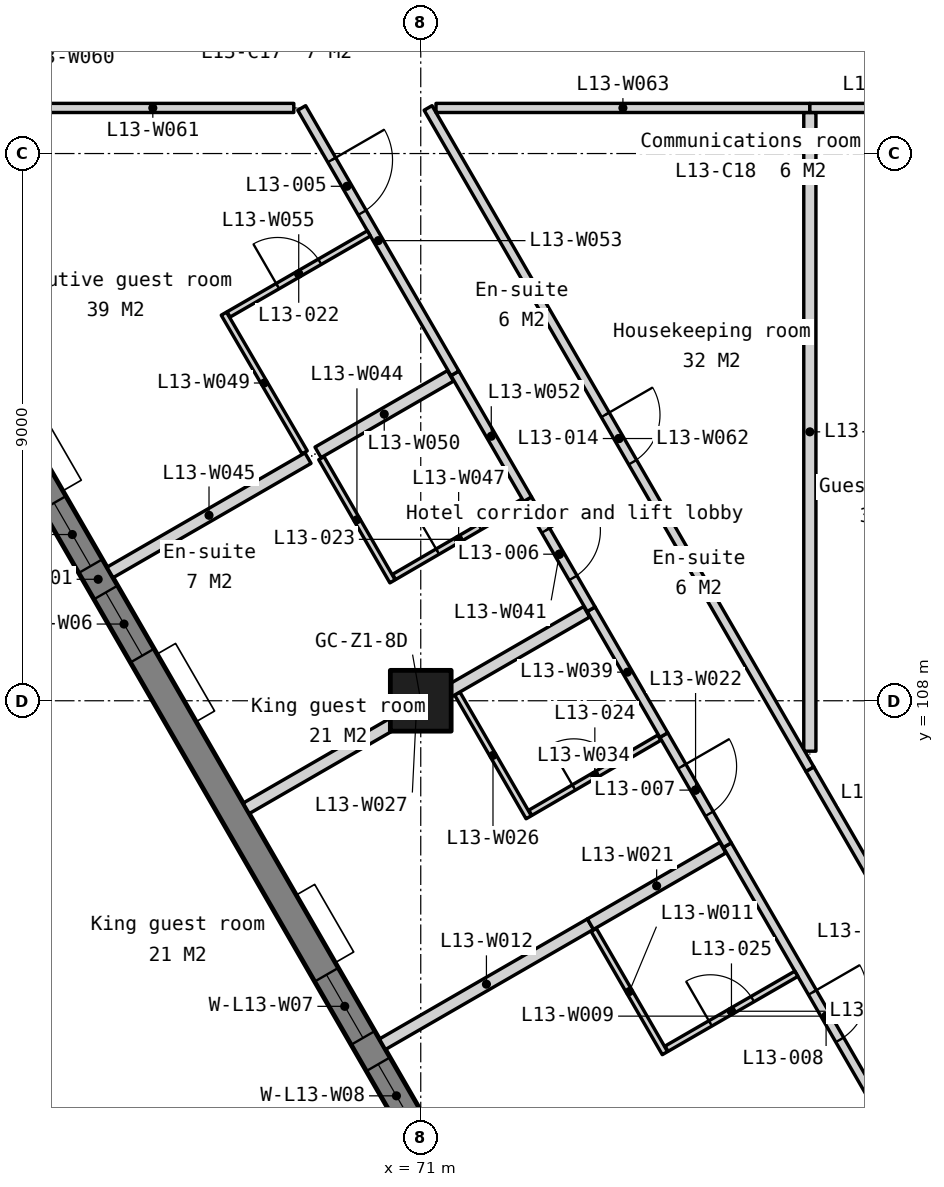
"""IFC4 building model, lengths in metres.
Left out: names, types, materials, properties, quantities, classifications, styles, units other than length and angle.
Written with IfcOpenShell. Run it as: python <this file> out.ifc"""

import sys

from ifc_helpers import new_model, si_unit, direction, frame, frame_2d, origin, origin_2d, place, context, subcontext, project, spatial, polyline, rectangle, outline, extrude, element, fill, save


model = new_model("IFC4")
c1 = context("Model", 3, precision=1e-05, world=origin(), true_north=direction((0.0, 1.0)))
c2 = subcontext(c1, "Body", "Model", "MODEL_VIEW")
j1 = project(units=[si_unit("LENGTHUNIT", "METRE"), si_unit("PLANEANGLEUNIT", "RADIAN")], contexts=[c1])
p1 = place(None, origin())
s1 = spatial("IfcSite", under=j1, at=p1, CompositionType="ELEMENT")
p2 = place(p1, origin())
s2 = spatial("IfcBuilding", under=s1, at=p2, CompositionType="ELEMENT")
p3 = place(p2, frame((0.0, 0.0, 59.5)))
s3 = spatial("IfcBuildingStorey", under=s2, at=p3, CompositionType="ELEMENT", Elevation=59.5)
p4 = place(p3, frame((71.0, 108.0, 0.0), z_axis=(0.0, 0.0, 1.0), x_axis=(1.0, 0.0, 0.0)))
e1 = element("IfcColumn", 1, at=p4, inside=s3, PredefinedType="COLUMN", context=c2, shape_type="SweptSolid", body=[
    extrude(rectangle(XDim=1.0, YDim=1.0, at=origin_2d()), origin(), (0.0, 0.0, 1.0), 3.5),
])
p5 = place(p3, frame((54.495, 129.397, -0.15), z_axis=(0.0, 0.0, 1.0), x_axis=(0.499999201451, -0.866025864826, 0.0)))
e2 = element("IfcWall", 2, at=p5, inside=s3, PredefinedType="SOLIDWALL", context=c2, shape_type="SweptSolid", body=[
    extrude(outline(polyline([(44.8, 0.0), (44.8, 3.5), (0.0, 3.5), (0.0, 0.0), (44.8, 0.0)])), frame((0.0, 0.225, 0.0), z_axis=(0.0, -1.0, 0.0), x_axis=(1.0, 0.0, 0.0)), (0.0, 0.0, 1.0), 0.45),
])
p6 = place(p5, frame((3.03, 0.0, 1.05)))
e3 = element("IfcOpeningElement", 3, at=p6, cuts=e2, PredefinedType="OPENING", context=c2, shape_type="SweptSolid", body=[
    extrude(rectangle(XDim=1.2, YDim=1.5, at=frame_2d((0.6, 0.75))), frame((0.0, 0.235, 0.0), z_axis=(0.0, -1.0, 0.0), x_axis=(1.0, 0.0, 0.0)), (0.0, 0.0, 1.0), 0.47),
])
p7 = place(p5, frame((4.73, 0.0, 1.05)))
e4 = element("IfcOpeningElement", 4, at=p7, cuts=e2, PredefinedType="OPENING", context=c2, shape_type="SweptSolid", body=[
    extrude(rectangle(XDim=1.2, YDim=1.5, at=frame_2d((0.6, 0.75))), frame((0.0, 0.235, 0.0), z_axis=(0.0, -1.0, 0.0), x_axis=(1.0, 0.0, 0.0)), (0.0, 0.0, 1.0), 0.47),
])
p8 = place(p5, frame((11.99, 0.0, 1.05)))
e5 = element("IfcOpeningElement", 5, at=p8, cuts=e2, PredefinedType="OPENING", context=c2, shape_type="SweptSolid", body=[
    extrude(rectangle(XDim=1.2, YDim=1.5, at=frame_2d((0.6, 0.75))), frame((0.0, 0.235, 0.0), z_axis=(0.0, -1.0, 0.0), x_axis=(1.0, 0.0, 0.0)), (0.0, 0.0, 1.0), 0.47),
])
p9 = place(p5, frame((13.69, 0.0, 1.05)))
e6 = element("IfcOpeningElement", 6, at=p9, cuts=e2, PredefinedType="OPENING", context=c2, shape_type="SweptSolid", body=[
    extrude(rectangle(XDim=1.2, YDim=1.5, at=frame_2d((0.6, 0.75))), frame((0.0, 0.235, 0.0), z_axis=(0.0, -1.0, 0.0), x_axis=(1.0, 0.0, 0.0)), (0.0, 0.0, 1.0), 0.47),
])
p10 = place(p5, frame((20.95, 0.0, 1.05)))
e7 = element("IfcOpeningElement", 7, at=p10, cuts=e2, PredefinedType="OPENING", context=c2, shape_type="SweptSolid", body=[
    extrude(rectangle(XDim=1.2, YDim=1.5, at=frame_2d((0.6, 0.75))), frame((0.0, 0.235, 0.0), z_axis=(0.0, -1.0, 0.0), x_axis=(1.0, 0.0, 0.0)), (0.0, 0.0, 1.0), 0.47),
])
p11 = place(p5, frame((22.65, 0.0, 1.05)))
e8 = element("IfcOpeningElement", 8, at=p11, cuts=e2, PredefinedType="OPENING", context=c2, shape_type="SweptSolid", body=[
    extrude(rectangle(XDim=1.2, YDim=1.5, at=frame_2d((0.6, 0.75))), frame((0.0, 0.235, 0.0), z_axis=(0.0, -1.0, 0.0), x_axis=(1.0, 0.0, 0.0)), (0.0, 0.0, 1.0), 0.47),
])
p12 = place(p5, frame((29.91, 0.0, 1.05)))
e9 = element("IfcOpeningElement", 9, at=p12, cuts=e2, PredefinedType="OPENING", context=c2, shape_type="SweptSolid", body=[
    extrude(rectangle(XDim=1.2, YDim=1.5, at=frame_2d((0.6, 0.75))), frame((0.0, 0.235, 0.0), z_axis=(0.0, -1.0, 0.0), x_axis=(1.0, 0.0, 0.0)), (0.0, 0.0, 1.0), 0.47),
])
p13 = place(p5, frame((31.61, 0.0, 1.05)))
e10 = element("IfcOpeningElement", 10, at=p13, cuts=e2, PredefinedType="OPENING", context=c2, shape_type="SweptSolid", body=[
    extrude(rectangle(XDim=1.2, YDim=1.5, at=frame_2d((0.6, 0.75))), frame((0.0, 0.235, 0.0), z_axis=(0.0, -1.0, 0.0), x_axis=(1.0, 0.0, 0.0)), (0.0, 0.0, 1.0), 0.47),
])
p14 = place(p5, frame((38.87, 0.0, 1.05)))
e11 = element("IfcOpeningElement", 11, at=p14, cuts=e2, PredefinedType="OPENING", context=c2, shape_type="SweptSolid", body=[
    extrude(rectangle(XDim=1.2, YDim=1.5, at=frame_2d((0.6, 0.75))), frame((0.0, 0.235, 0.0), z_axis=(0.0, -1.0, 0.0), x_axis=(1.0, 0.0, 0.0)), (0.0, 0.0, 1.0), 0.47),
])
p15 = place(p5, frame((40.57, 0.0, 1.05)))
e12 = element("IfcOpeningElement", 12, at=p15, cuts=e2, PredefinedType="OPENING", context=c2, shape_type="SweptSolid", body=[
    extrude(rectangle(XDim=1.2, YDim=1.5, at=frame_2d((0.6, 0.75))), frame((0.0, 0.235, 0.0), z_axis=(0.0, -1.0, 0.0), x_axis=(1.0, 0.0, 0.0)), (0.0, 0.0, 1.0), 0.47),
])
p16 = place(p3, frame((76.042, 105.626, 0.0), z_axis=(0.0, 0.0, 1.0), x_axis=(0.499991405182, -0.866030365948, 0.0)))
e13 = element("IfcWall", 13, at=p16, inside=s3, PredefinedType="PARTITIONING", context=c2, shape_type="SweptSolid", body=[
    extrude(rectangle(XDim=6.496, YDim=0.15, at=frame_2d((3.248, 0.0))), origin(), (0.0, 0.0, 1.0), 3.35),
])
p17 = place(p16, frame((2.798, 0.0, 0.0)))
e14 = element("IfcOpeningElement", 14, at=p17, cuts=e13, PredefinedType="OPENING", context=c2, shape_type="SweptSolid", body=[
    extrude(rectangle(XDim=0.9, YDim=2.1, at=frame_2d((0.45, 1.05))), frame((0.0, 0.085, 0.0), z_axis=(0.0, -1.0, 0.0), x_axis=(1.0, 0.0, 0.0)), (0.0, 0.0, 1.0), 0.17),
])
p18 = place(p3, frame((73.845, 104.23, 0.0), z_axis=(0.0, 0.0, 1.0), x_axis=(0.500032503492, -0.866006637072, 0.0)))
e15 = element("IfcWall", 15, at=p18, inside=s3, PredefinedType="PARTITIONING", context=c2, shape_type="SweptSolid", body=[
    extrude(rectangle(XDim=2.34, YDim=0.1, at=frame_2d((1.17, 0.0))), origin(), (0.0, 0.0, 1.0), 3.35),
])
p19 = place(p3, frame((70.37, 102.351, 0.0), z_axis=(0.0, 0.0, 1.0), x_axis=(0.866020906874, 0.500007788796, 0.0)))
e16 = element("IfcWall", 16, at=p19, inside=s3, PredefinedType="PARTITIONING", context=c2, shape_type="SweptSolid", body=[
    extrude(rectangle(XDim=3.95, YDim=0.2, at=frame_2d((1.975, 0.0))), origin(), (0.0, 0.0, 1.0), 3.35),
])
p20 = place(p3, frame((75.042, 102.277, 0.0), z_axis=(0.0, 0.0, 1.0), x_axis=(0.865997559407, 0.500048224776, 0.0)))
e17 = element("IfcWall", 17, at=p20, inside=s3, PredefinedType="PARTITIONING", context=c2, shape_type="SweptSolid", body=[
    extrude(rectangle(XDim=2.465, YDim=0.1, at=frame_2d((1.232, 0.0))), origin(), (0.0, 0.0, 1.0), 3.35),
])
p21 = place(p20, frame((0.833, 0.0, 0.0)))
e18 = element("IfcOpeningElement", 18, at=p21, cuts=e17, PredefinedType="OPENING", context=c2, shape_type="SweptSolid", body=[
    extrude(rectangle(XDim=0.8, YDim=2.1, at=frame_2d((0.4, 1.05))), frame((0.0, 0.06, 0.0), z_axis=(0.0, -1.0, 0.0), x_axis=(1.0, 0.0, 0.0)), (0.0, 0.0, 1.0), 0.12),
])
p22 = place(p3, frame((73.791, 104.326, 0.0), z_axis=(0.0, 0.0, 1.0), x_axis=(0.866006140796, 0.500033362991, 0.0)))
e19 = element("IfcWall", 19, at=p22, inside=s3, PredefinedType="PARTITIONING", context=c2, shape_type="SweptSolid", body=[
    extrude(rectangle(XDim=2.515, YDim=0.2, at=frame_2d((1.257, 0.0))), origin(), (0.0, 0.0, 1.0), 3.35),
])
p23 = place(p3, frame((74.997, 107.436, 0.0), z_axis=(0.0, 0.0, 1.0), x_axis=(0.500096586542, -0.865969632337, 0.0)))
e20 = element("IfcWall", 20, at=p23, inside=s3, PredefinedType="PARTITIONING", context=c2, shape_type="SweptSolid", body=[
    extrude(rectangle(XDim=2.09, YDim=0.15, at=frame_2d((1.045, 0.0))), origin(), (0.0, 0.0, 1.0), 3.35),
])
p24 = place(p23, frame((0.595, 0.0, 0.0)))
e21 = element("IfcOpeningElement", 21, at=p24, cuts=e20, PredefinedType="OPENING", context=c2, shape_type="SweptSolid", body=[
    extrude(rectangle(XDim=0.9, YDim=2.1, at=frame_2d((0.45, 1.05))), frame((0.0, 0.085, 0.0), z_axis=(0.0, -1.0, 0.0), x_axis=(1.0, 0.0, 0.0)), (0.0, 0.0, 1.0), 0.17),
])
p25 = place(p3, frame((71.601, 108.119, 0.0), z_axis=(0.0, 0.0, 1.0), x_axis=(0.499938297808, -0.866061024631, 0.0)))
e22 = element("IfcWall", 22, at=p25, inside=s3, PredefinedType="PARTITIONING", context=c2, shape_type="SweptSolid", body=[
    extrude(rectangle(XDim=2.35, YDim=0.1, at=frame_2d((1.175, 0.0))), origin(), (0.0, 0.0, 1.0), 3.35),
])
p26 = place(p3, frame((68.13, 106.23, 0.0), z_axis=(0.0, 0.0, 1.0), x_axis=(0.86603151488, 0.499989415123, 0.0)))
e23 = element("IfcWall", 23, at=p26, inside=s3, PredefinedType="PARTITIONING", context=c2, shape_type="SweptSolid", body=[
    extrude(rectangle(XDim=6.465, YDim=0.2, at=frame_2d((3.232, 0.0))), origin(), (0.0, 0.0, 1.0), 3.35),
])
p27 = place(p3, frame((77.399, 106.875, 0.0), z_axis=(0.0, 0.0, 1.0), x_axis=(0.500017996867, -0.866015013039, 0.0)))
e24 = element("IfcWall", 24, at=p27, inside=s3, PredefinedType="PARTITIONING", context=c2, shape_type="SweptSolid", body=[
    extrude(rectangle(XDim=5.077, YDim=0.15, at=frame_2d((2.539, 0.0))), origin(), (0.0, 0.0, 1.0), 3.35),
])
p28 = place(p27, frame((2.088, 0.0, 0.0)))
e25 = element("IfcOpeningElement", 25, at=p28, cuts=e24, PredefinedType="OPENING", context=c2, shape_type="SweptSolid", body=[
    extrude(rectangle(XDim=0.9, YDim=2.1, at=frame_2d((0.45, 1.05))), frame((0.0, 0.085, 0.0), z_axis=(0.0, -1.0, 0.0), x_axis=(1.0, 0.0, 0.0)), (0.0, 0.0, 1.0), 0.17),
])
p29 = place(p3, frame((77.399, 107.171, 0.0), z_axis=(0.0, 0.0, 1.0), x_axis=(0.0, 1.0, 0.0)))
e26 = element("IfcWall", 26, at=p29, inside=s3, PredefinedType="PARTITIONING", context=c2, shape_type="SweptSolid", body=[
    extrude(rectangle(XDim=10.504, YDim=0.2, at=frame_2d((5.252, 0.0))), origin(), (0.0, 0.0, 1.0), 3.35),
])
p30 = place(p3, frame((72.802, 106.157, 0.0), z_axis=(0.0, 0.0, 1.0), x_axis=(0.864132137734, 0.503264988386, 0.0)))
e27 = element("IfcWall", 27, at=p30, inside=s3, PredefinedType="PARTITIONING", context=c2, shape_type="SweptSolid", body=[
    extrude(rectangle(XDim=2.455, YDim=0.1, at=frame_2d((1.228, 0.0))), origin(), (0.0, 0.0, 1.0), 3.35),
])
p31 = place(p30, frame((0.827, 0.0, 0.0)))
e28 = element("IfcOpeningElement", 28, at=p31, cuts=e27, PredefinedType="OPENING", context=c2, shape_type="SweptSolid", body=[
    extrude(rectangle(XDim=0.8, YDim=2.1, at=frame_2d((0.4, 1.05))), frame((0.0, 0.06, 0.0), z_axis=(0.0, -1.0, 0.0), x_axis=(1.0, 0.0, 0.0)), (0.0, 0.0, 1.0), 0.12),
])
p32 = place(p3, frame((73.802, 109.505, 0.0), z_axis=(0.0, 0.0, 1.0), x_axis=(0.499940577336, -0.866059708757, 0.0)))
e29 = element("IfcWall", 29, at=p32, inside=s3, PredefinedType="PARTITIONING", context=c2, shape_type="SweptSolid", body=[
    extrude(rectangle(XDim=2.39, YDim=0.15, at=frame_2d((1.195, 0.0))), origin(), (0.0, 0.0, 1.0), 3.35),
])
p33 = place(p3, frame((72.757, 111.315, 0.0), z_axis=(0.0, 0.0, 1.0), x_axis=(0.500046000743, -0.865998843614, 0.0)))
e30 = element("IfcWall", 30, at=p33, inside=s3, PredefinedType="PARTITIONING", context=c2, shape_type="SweptSolid", body=[
    extrude(rectangle(XDim=2.09, YDim=0.15, at=frame_2d((1.045, 0.0))), origin(), (0.0, 0.0, 1.0), 3.35),
])
p34 = place(p33, frame((0.595, 0.0, 0.0)))
e31 = element("IfcOpeningElement", 31, at=p34, cuts=e30, PredefinedType="OPENING", context=c2, shape_type="SweptSolid", body=[
    extrude(rectangle(XDim=0.9, YDim=2.1, at=frame_2d((0.45, 1.05))), frame((0.0, 0.085, 0.0), z_axis=(0.0, -1.0, 0.0), x_axis=(1.0, 0.0, 0.0)), (0.0, 0.0, 1.0), 0.17),
])
p35 = place(p3, frame((69.365, 111.99, 0.0), z_axis=(0.0, 0.0, 1.0), x_axis=(0.499999433879, -0.866025730634, 0.0)))
e32 = element("IfcWall", 32, at=p35, inside=s3, PredefinedType="PARTITIONING", context=c2, shape_type="SweptSolid", body=[
    extrude(rectangle(XDim=2.34, YDim=0.1, at=frame_2d((1.17, 0.0))), origin(), (0.0, 0.0, 1.0), 3.35),
])
p36 = place(p3, frame((65.89, 110.11, 0.0), z_axis=(0.0, 0.0, 1.0), x_axis=(0.866045024864, 0.499966013754, 0.0)))
e33 = element("IfcWall", 33, at=p36, inside=s3, PredefinedType="PARTITIONING", context=c2, shape_type="SweptSolid", body=[
    extrude(rectangle(XDim=3.76, YDim=0.2, at=frame_2d((1.88, 0.0))), origin(), (0.0, 0.0, 1.0), 3.35),
])
p37 = place(p3, frame((70.562, 110.037, 0.0), z_axis=(0.0, 0.0, 1.0), x_axis=(0.864132137734, 0.503264988386, 0.0)))
e34 = element("IfcWall", 34, at=p37, inside=s3, PredefinedType="PARTITIONING", context=c2, shape_type="SweptSolid", body=[
    extrude(rectangle(XDim=2.455, YDim=0.1, at=frame_2d((1.228, 0.0))), origin(), (0.0, 0.0, 1.0), 3.35),
])
p38 = place(p37, frame((0.827, 0.0, 0.0)))
e35 = element("IfcOpeningElement", 35, at=p38, cuts=e34, PredefinedType="OPENING", context=c2, shape_type="SweptSolid", body=[
    extrude(rectangle(XDim=0.8, YDim=2.1, at=frame_2d((0.4, 1.05))), frame((0.0, 0.06, 0.0), z_axis=(0.0, -1.0, 0.0), x_axis=(1.0, 0.0, 0.0)), (0.0, 0.0, 1.0), 0.12),
])
p39 = place(p3, frame((67.762, 114.367, 0.0), z_axis=(0.0, 0.0, 1.0), x_axis=(0.503163628445, -0.86419116115, 0.0)))
e36 = element("IfcWall", 36, at=p39, inside=s3, PredefinedType="PARTITIONING", context=c2, shape_type="SweptSolid", body=[
    extrude(rectangle(XDim=2.64, YDim=0.1, at=frame_2d((1.32, 0.0))), origin(), (0.0, 0.0, 1.0), 3.35),
])
p40 = place(p3, frame((69.311, 112.085, 0.0), z_axis=(0.0, 0.0, 1.0), x_axis=(0.866006140796, 0.500033362991, 0.0)))
e37 = element("IfcWall", 37, at=p40, inside=s3, PredefinedType="PARTITIONING", context=c2, shape_type="SweptSolid", body=[
    extrude(rectangle(XDim=2.515, YDim=0.2, at=frame_2d((1.257, 0.0))), origin(), (0.0, 0.0, 1.0), 3.35),
])
p41 = place(p3, frame((71.562, 113.385, 0.0), z_axis=(0.0, 0.0, 1.0), x_axis=(0.499940577336, -0.866059708757, 0.0)))
e38 = element("IfcWall", 38, at=p41, inside=s3, PredefinedType="PARTITIONING", context=c2, shape_type="SweptSolid", body=[
    extrude(rectangle(XDim=2.39, YDim=0.15, at=frame_2d((1.195, 0.0))), origin(), (0.0, 0.0, 1.0), 3.35),
])
p42 = place(p3, frame((69.042, 117.75, 0.0), z_axis=(0.0, 0.0, 1.0), x_axis=(0.500004791531, -0.866022637375, 0.0)))
e39 = element("IfcWall", 39, at=p42, inside=s3, PredefinedType="PARTITIONING", context=c2, shape_type="SweptSolid", body=[
    extrude(rectangle(XDim=5.04, YDim=0.15, at=frame_2d((2.52, 0.0))), origin(), (0.0, 0.0, 1.0), 3.35),
])
p43 = place(p42, frame((0.988, 0.0, 0.0)))
e40 = element("IfcOpeningElement", 40, at=p43, cuts=e39, PredefinedType="OPENING", context=c2, shape_type="SweptSolid", body=[
    extrude(rectangle(XDim=1.0, YDim=2.1, at=frame_2d((0.5, 1.05))), frame((0.0, 0.085, 0.0), z_axis=(0.0, -1.0, 0.0), x_axis=(1.0, 0.0, 0.0)), (0.0, 0.0, 1.0), 0.17),
])
p44 = place(p3, frame((67.839, 114.354, 0.0), z_axis=(0.0, 0.0, 1.0), x_axis=(0.86601318911, 0.500021155841, 0.0)))
e41 = element("IfcWall", 41, at=p44, inside=s3, PredefinedType="PARTITIONING", context=c2, shape_type="SweptSolid", body=[
    extrude(rectangle(XDim=2.665, YDim=0.1, at=frame_2d((1.333, 0.0))), origin(), (0.0, 0.0, 1.0), 3.35),
])
p45 = place(p44, frame((0.933, 0.0, 0.0)))
e42 = element("IfcOpeningElement", 42, at=p45, cuts=e41, PredefinedType="OPENING", context=c2, shape_type="SweptSolid", body=[
    extrude(rectangle(XDim=0.8, YDim=2.1, at=frame_2d((0.4, 1.05))), frame((0.0, 0.06, 0.0), z_axis=(0.0, -1.0, 0.0), x_axis=(1.0, 0.0, 0.0)), (0.0, 0.0, 1.0), 0.12),
])
p46 = place(p3, frame((64.275, 117.75, 0.0), z_axis=(0.0, 0.0, 1.0), x_axis=(1.0, 0.0, 0.0)))
e43 = element("IfcWall", 43, at=p46, inside=s3, PredefinedType="PARTITIONING", context=c2, shape_type="SweptSolid", body=[
    extrude(rectangle(XDim=4.637, YDim=0.15, at=frame_2d((2.319, 0.0))), origin(), (0.0, 0.0, 1.0), 3.35),
])
p47 = place(p3, frame((71.121, 117.75, 0.0), z_axis=(0.0, 0.0, 1.0), x_axis=(0.499995104884, -0.866028229963, 0.0)))
e44 = element("IfcWall", 44, at=p47, inside=s3, PredefinedType="PARTITIONING", context=c2, shape_type="SweptSolid", body=[
    extrude(rectangle(XDim=12.557, YDim=0.15, at=frame_2d((6.278, 0.0))), origin(), (0.0, 0.0, 1.0), 3.35),
])
p48 = place(p47, frame((5.828, 0.0, 0.0)))
e45 = element("IfcOpeningElement", 45, at=p48, cuts=e44, PredefinedType="OPENING", context=c2, shape_type="SweptSolid", body=[
    extrude(rectangle(XDim=0.9, YDim=2.1, at=frame_2d((0.45, 1.05))), frame((0.0, 0.085, 0.0), z_axis=(0.0, -1.0, 0.0), x_axis=(1.0, 0.0, 0.0)), (0.0, 0.0, 1.0), 0.17),
])
p49 = place(p3, frame((71.25, 117.75, 0.0), z_axis=(0.0, 0.0, 1.0), x_axis=(1.0, 0.0, 0.0)))
e46 = element("IfcWall", 46, at=p49, inside=s3, PredefinedType="PARTITIONING", context=c2, shape_type="SweptSolid", body=[
    extrude(rectangle(XDim=6.148, YDim=0.15, at=frame_2d((3.074, 0.0))), origin(), (0.0, 0.0, 1.0), 3.35),
])
p50 = place(p3, frame((77.399, 117.75, 0.0), z_axis=(0.0, 0.0, 1.0), x_axis=(1.0, 0.0, 0.0)))
e47 = element("IfcWall", 47, at=p50, inside=s3, PredefinedType="PARTITIONING", context=c2, shape_type="SweptSolid", body=[
    extrude(rectangle(XDim=2.601, YDim=0.15, at=frame_2d((1.301, 0.0))), origin(), (0.0, 0.0, 1.0), 3.35),
])
p51 = place(p10, origin())
e48 = element("IfcWindow", 48, at=p51, inside=s3, PartitioningType="SINGLE_PANEL", PredefinedType="WINDOW", context=c2, shape_type="SweptSolid", body=[
    extrude(rectangle(XDim=1.2, YDim=1.5, at=frame_2d((0.6, 0.75))), frame((0.0, 0.03, 0.0), z_axis=(0.0, -1.0, 0.0), x_axis=(1.0, 0.0, 0.0)), (0.0, 0.0, 1.0), 0.06),
])
fill(e7, e48)
p52 = place(p11, origin())
e49 = element("IfcWindow", 49, at=p52, inside=s3, PartitioningType="SINGLE_PANEL", PredefinedType="WINDOW", context=c2, shape_type="SweptSolid", body=[
    extrude(rectangle(XDim=1.2, YDim=1.5, at=frame_2d((0.6, 0.75))), frame((0.0, 0.03, 0.0), z_axis=(0.0, -1.0, 0.0), x_axis=(1.0, 0.0, 0.0)), (0.0, 0.0, 1.0), 0.06),
])
fill(e8, e49)
p53 = place(p12, origin())
e50 = element("IfcWindow", 50, at=p53, inside=s3, PartitioningType="SINGLE_PANEL", PredefinedType="WINDOW", context=c2, shape_type="SweptSolid", body=[
    extrude(rectangle(XDim=1.2, YDim=1.5, at=frame_2d((0.6, 0.75))), frame((0.0, 0.03, 0.0), z_axis=(0.0, -1.0, 0.0), x_axis=(1.0, 0.0, 0.0)), (0.0, 0.0, 1.0), 0.06),
])
fill(e9, e50)
p54 = place(p13, origin())
e51 = element("IfcWindow", 51, at=p54, inside=s3, PartitioningType="SINGLE_PANEL", PredefinedType="WINDOW", context=c2, shape_type="SweptSolid", body=[
    extrude(rectangle(XDim=1.2, YDim=1.5, at=frame_2d((0.6, 0.75))), frame((0.0, 0.03, 0.0), z_axis=(0.0, -1.0, 0.0), x_axis=(1.0, 0.0, 0.0)), (0.0, 0.0, 1.0), 0.06),
])
fill(e10, e51)
p55 = place(p43, origin())
e52 = element("IfcDoor", 52, at=p55, inside=s3, OperationType="SINGLE_SWING_LEFT", PredefinedType="DOOR", context=c2, shape_type="SweptSolid", body=[
    extrude(rectangle(XDim=1.0, YDim=2.1, at=frame_2d((0.5, 1.05))), frame((0.0, 0.025, 0.0), z_axis=(0.0, -1.0, 0.0), x_axis=(1.0, 0.0, 0.0)), (0.0, 0.0, 1.0), 0.05),
])
fill(e40, e52)
p56 = place(p34, origin())
e53 = element("IfcDoor", 53, at=p56, inside=s3, OperationType="SINGLE_SWING_LEFT", PredefinedType="DOOR", context=c2, shape_type="SweptSolid", body=[
    extrude(rectangle(XDim=0.9, YDim=2.1, at=frame_2d((0.45, 1.05))), frame((0.0, 0.025, 0.0), z_axis=(0.0, -1.0, 0.0), x_axis=(1.0, 0.0, 0.0)), (0.0, 0.0, 1.0), 0.05),
])
fill(e31, e53)
p57 = place(p24, origin())
e54 = element("IfcDoor", 54, at=p57, inside=s3, OperationType="SINGLE_SWING_LEFT", PredefinedType="DOOR", context=c2, shape_type="SweptSolid", body=[
    extrude(rectangle(XDim=0.9, YDim=2.1, at=frame_2d((0.45, 1.05))), frame((0.0, 0.025, 0.0), z_axis=(0.0, -1.0, 0.0), x_axis=(1.0, 0.0, 0.0)), (0.0, 0.0, 1.0), 0.05),
])
fill(e21, e54)
p58 = place(p17, origin())
e55 = element("IfcDoor", 55, at=p58, inside=s3, OperationType="SINGLE_SWING_LEFT", PredefinedType="DOOR", context=c2, shape_type="SweptSolid", body=[
    extrude(rectangle(XDim=0.9, YDim=2.1, at=frame_2d((0.45, 1.05))), frame((0.0, 0.025, 0.0), z_axis=(0.0, -1.0, 0.0), x_axis=(1.0, 0.0, 0.0)), (0.0, 0.0, 1.0), 0.05),
])
fill(e14, e55)
p59 = place(p48, origin())
e56 = element("IfcDoor", 56, at=p59, inside=s3, OperationType="SINGLE_SWING_LEFT", PredefinedType="DOOR", context=c2, shape_type="SweptSolid", body=[
    extrude(rectangle(XDim=0.9, YDim=2.1, at=frame_2d((0.45, 1.05))), frame((0.0, 0.025, 0.0), z_axis=(0.0, -1.0, 0.0), x_axis=(1.0, 0.0, 0.0)), (0.0, 0.0, 1.0), 0.05),
])
fill(e45, e56)
p60 = place(p45, origin())
e57 = element("IfcDoor", 57, at=p60, inside=s3, OperationType="SINGLE_SWING_LEFT", PredefinedType="DOOR", context=c2, shape_type="SweptSolid", body=[
    extrude(rectangle(XDim=0.8, YDim=2.1, at=frame_2d((0.4, 1.05))), frame((0.0, 0.025, 0.0), z_axis=(0.0, -1.0, 0.0), x_axis=(1.0, 0.0, 0.0)), (0.0, 0.0, 1.0), 0.05),
])
fill(e42, e57)
p61 = place(p38, origin())
e58 = element("IfcDoor", 58, at=p61, inside=s3, OperationType="SINGLE_SWING_LEFT", PredefinedType="DOOR", context=c2, shape_type="SweptSolid", body=[
    extrude(rectangle(XDim=0.8, YDim=2.1, at=frame_2d((0.4, 1.05))), frame((0.0, 0.025, 0.0), z_axis=(0.0, -1.0, 0.0), x_axis=(1.0, 0.0, 0.0)), (0.0, 0.0, 1.0), 0.05),
])
fill(e35, e58)
p62 = place(p31, origin())
e59 = element("IfcDoor", 59, at=p62, inside=s3, OperationType="SINGLE_SWING_LEFT", PredefinedType="DOOR", context=c2, shape_type="SweptSolid", body=[
    extrude(rectangle(XDim=0.8, YDim=2.1, at=frame_2d((0.4, 1.05))), frame((0.0, 0.025, 0.0), z_axis=(0.0, -1.0, 0.0), x_axis=(1.0, 0.0, 0.0)), (0.0, 0.0, 1.0), 0.05),
])
fill(e28, e59)
p63 = place(p21, origin())
e60 = element("IfcDoor", 60, at=p63, inside=s3, OperationType="SINGLE_SWING_LEFT", PredefinedType="DOOR", context=c2, shape_type="SweptSolid", body=[
    extrude(rectangle(XDim=0.8, YDim=2.1, at=frame_2d((0.4, 1.05))), frame((0.0, 0.025, 0.0), z_axis=(0.0, -1.0, 0.0), x_axis=(1.0, 0.0, 0.0)), (0.0, 0.0, 1.0), 0.05),
])
fill(e18, e60)
save(model, sys.argv[1])
